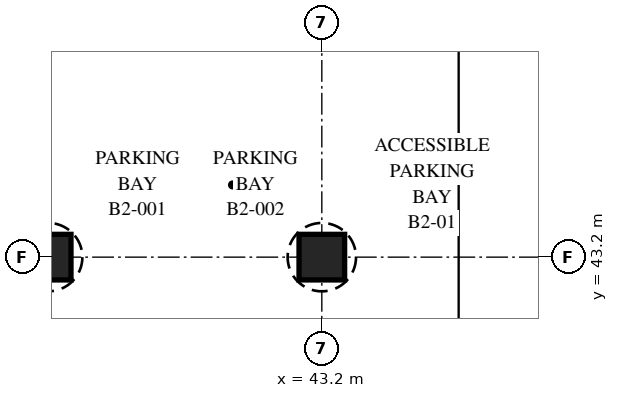
"""IFC4 building model, lengths in metres.
Left out: names, types, materials, properties, quantities, classifications, styles, units other than length and angle.
Written with IfcOpenShell. Run it as: python <this file> out.ifc"""

import sys

from ifc_helpers import new_model, si_unit, direction, frame, origin, origin_2d, place, context, subcontext, project, spatial, rectangle, extrude, element, save


model = new_model("IFC4")
c1 = context("Model", 3, precision=1e-05, world=origin(), true_north=direction((0.0, 1.0)))
c2 = subcontext(c1, "Body", "Model", "MODEL_VIEW")
j1 = project(units=[si_unit("LENGTHUNIT", "METRE"), si_unit("PLANEANGLEUNIT", "RADIAN")], contexts=[c1])
p1 = place(None, origin())
s1 = spatial("IfcSite", under=j1, at=p1, CompositionType="ELEMENT")
p2 = place(p1, origin())
s2 = spatial("IfcBuilding", under=s1, at=p2, CompositionType="ELEMENT")
p3 = place(p2, frame((0.0, 0.0, -9.0)))
s3 = spatial("IfcBuildingStorey", under=s2, at=p3, CompositionType="ELEMENT", Elevation=-9.0)
for number, where, z_axis, x_axis in (
    (1, (36.0, 43.2, 0.0), (0.0, 0.0, 1.0), (1.0, 0.0, 0.0)),
    (2, (43.2, 43.2, 0.0), (0.0, 0.0, 1.0), (1.0, 0.0, 0.0)),
):
    element("IfcColumn", number, at=place(p3, frame(where, z_axis=z_axis, x_axis=x_axis)), inside=s3, PredefinedType="COLUMN", context=c2, shape_type="SweptSolid", body=[
        extrude(rectangle(XDim=1.2, YDim=1.2, at=origin_2d()), origin(), (0.0, 0.0, 1.0), 4.2),
    ])
save(model, sys.argv[1])
